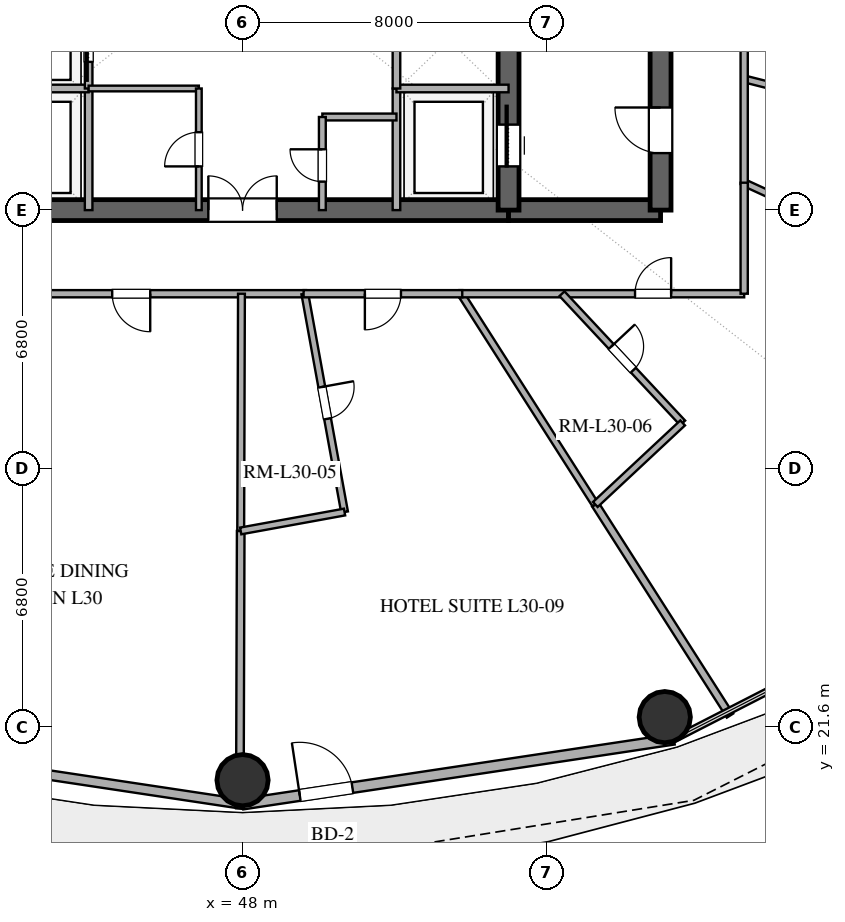
"""IFC4 building model, lengths in metres.
Left out: names, types, materials, properties, quantities, classifications, styles, units other than length and angle.
Written with IfcOpenShell. Run it as: python <this file> out.ifc"""

import sys

from ifc_helpers import new_model, si_unit, direction, frame, frame_2d, origin, origin_2d, place, context, subcontext, project, spatial, rectangle, hollow_circle, extrude, element, fill, save


model = new_model("IFC4")
c1 = context("Model", 3, precision=1e-05, world=origin(), true_north=direction((0.0, 1.0)))
c2 = subcontext(c1, "Body", "Model", "MODEL_VIEW")
j1 = project(units=[si_unit("LENGTHUNIT", "METRE"), si_unit("PLANEANGLEUNIT", "RADIAN")], contexts=[c1])
p1 = place(None, origin())
s1 = spatial("IfcSite", under=j1, at=p1, CompositionType="ELEMENT")
p2 = place(p1, origin())
s2 = spatial("IfcBuilding", under=s1, at=p2, CompositionType="ELEMENT")
p3 = place(p2, frame((0.0, 0.0, 120.0)))
s3 = spatial("IfcBuildingStorey", under=s2, at=p3, CompositionType="ELEMENT", Elevation=120.0)
p4 = place(p3, frame((41.0, 35.2, 0.0), z_axis=(0.0, 0.0, 1.0), x_axis=(1.0, 0.0, 0.0)))
e1 = element("IfcWall", 1, at=p4, inside=s3, PredefinedType="SHEAR", context=c2, shape_type="SweptSolid", body=[
    extrude(rectangle(XDim=14.0, YDim=0.55, at=frame_2d((7.0, 0.0))), origin(), (0.0, 0.0, 1.0), 3.38),
])
p5 = place(p4, frame((6.1, 0.0, 0.0)))
e2 = element("IfcOpeningElement", 2, at=p5, cuts=e1, PredefinedType="OPENING", context=c2, shape_type="SweptSolid", body=[
    extrude(rectangle(XDim=1.8, YDim=2.25, at=frame_2d((0.9, 1.125))), frame((0.0, 0.285, 0.0), z_axis=(0.0, -1.0, 0.0), x_axis=(1.0, 0.0, 0.0)), (0.0, 0.0, 1.0), 0.57),
])
p6 = place(p3, frame((55.0, 35.2, 0.0), z_axis=(0.0, 0.0, 1.0), x_axis=(1.0, 0.0, 0.0)))
e3 = element("IfcWall", 3, at=p6, inside=s3, PredefinedType="SHEAR", context=c2, shape_type="SweptSolid", body=[
    extrude(rectangle(XDim=4.0, YDim=0.55, at=frame_2d((2.0, 0.0))), origin(), (0.0, 0.0, 1.0), 3.38),
])
p7 = place(p3, frame((59.0, 35.2, 0.0), z_axis=(0.0, 0.0, 1.0), x_axis=(0.0, 1.0, 0.0)))
e4 = element("IfcWall", 4, at=p7, inside=s3, PredefinedType="SHEAR", context=c2, shape_type="SweptSolid", body=[
    extrude(rectangle(XDim=13.6, YDim=0.55, at=frame_2d((6.8, 0.0))), origin(), (0.0, 0.0, 1.0), 3.38),
])
p8 = place(p7, frame((1.5, 0.0, 0.0)))
e5 = element("IfcOpeningElement", 5, at=p8, cuts=e4, PredefinedType="OPENING", context=c2, shape_type="SweptSolid", body=[
    extrude(rectangle(XDim=1.2, YDim=2.15, at=frame_2d((0.6, 1.075))), frame((0.0, 0.285, 0.0), z_axis=(0.0, -1.0, 0.0), x_axis=(1.0, 0.0, 0.0)), (0.0, 0.0, 1.0), 0.57),
])
p9 = place(p3, frame((55.0, 35.2, 0.0), z_axis=(0.0, 0.0, 1.0), x_axis=(0.0, 1.0, 0.0)))
e6 = element("IfcWall", 6, at=p9, inside=s3, PredefinedType="SHEAR", context=c2, shape_type="SweptSolid", body=[
    extrude(rectangle(XDim=13.6, YDim=0.55, at=frame_2d((6.8, 0.0))), origin(), (0.0, 0.0, 1.0), 3.38),
])
p10 = place(p9, frame((1.15, 0.0, 0.0)))
e7 = element("IfcOpeningElement", 7, at=p10, cuts=e6, PredefinedType="OPENING", context=c2, shape_type="SweptSolid", body=[
    extrude(rectangle(XDim=1.1, YDim=2.2, at=frame_2d((0.55, 1.1))), frame((0.0, 0.285, 0.0), z_axis=(0.0, -1.0, 0.0), x_axis=(1.0, 0.0, 0.0)), (0.0, 0.0, 1.0), 0.57),
])
for number, where, z_axis, x_axis in (
    (8, (48.0, 20.2, 0.0), (0.0, 0.0, 1.0), (1.0, 0.0, 0.0)),
    (9, (59.11, 21.859, 0.0), (0.0, 0.0, 1.0), (1.0, 0.0, 0.0)),
):
    element("IfcColumn", number, at=place(p3, frame(where, z_axis=z_axis, x_axis=x_axis)), inside=s3, PredefinedType="COLUMN", context=c2, shape_type="SweptSolid", body=[
        extrude(hollow_circle(Radius=0.675, WallThickness=0.036, at=origin_2d()), origin(), (0.0, 0.0, 1.0), 3.38),
    ])
p11 = place(p3, frame((36.649, 21.277, 0.0), z_axis=(0.0, 0.0, 1.0), x_axis=(0.988877774656, -0.148730450117, 0.0)))
e10 = element("IfcWall", 10, at=p11, inside=s3, PredefinedType="SOLIDWALL", context=c2, shape_type="SweptSolid", body=[
    extrude(rectangle(XDim=11.479, YDim=0.25, at=frame_2d((5.74, 0.0))), origin(), (0.0, 0.0, 1.0), 3.38),
])
p12 = place(p11, frame((2.926, 0.0, 1.42)))
e11 = element("IfcOpeningElement", 11, at=p12, cuts=e10, PredefinedType="OPENING", context=c2, shape_type="SweptSolid", body=[
    extrude(rectangle(XDim=1.0, YDim=1.05, at=frame_2d((0.5, 0.525))), frame((0.0, 0.135, 0.0), z_axis=(0.0, -1.0, 0.0), x_axis=(1.0, 0.0, 0.0)), (0.0, 0.0, 1.0), 0.27),
])
p13 = place(p3, frame((48.0, 19.57, 0.0), z_axis=(0.0, 0.0, 1.0), x_axis=(0.988877774656, 0.148730450117, 0.0)))
e12 = element("IfcWall", 12, at=p13, inside=s3, PredefinedType="SOLIDWALL", context=c2, shape_type="SweptSolid", body=[
    extrude(rectangle(XDim=11.479, YDim=0.28, at=frame_2d((5.74, 0.0))), origin(), (0.0, 0.0, 1.0), 3.38),
])
p14 = place(p13, frame((1.524, 0.0, 0.0)))
e13 = element("IfcOpeningElement", 13, at=p14, cuts=e12, PredefinedType="OPENING", context=c2, shape_type="SweptSolid", body=[
    extrude(rectangle(XDim=1.4, YDim=2.2, at=frame_2d((0.7, 1.1))), frame((0.0, 0.15, 0.0), z_axis=(0.0, -1.0, 0.0), x_axis=(1.0, 0.0, 0.0)), (0.0, 0.0, 1.0), 0.3),
])
p15 = place(p3, frame((43.95, 35.2, 0.0), z_axis=(0.0, 0.0, 1.0), x_axis=(0.0, 1.0, 0.0)))
e14 = element("IfcWall", 14, at=p15, inside=s3, PredefinedType="SOLIDWALL", context=c2, shape_type="SweptSolid", body=[
    extrude(rectangle(XDim=3.2, YDim=0.2, at=frame_2d((1.6, 0.0))), origin(), (0.0, 0.0, 1.0), 2.74),
])
p16 = place(p3, frame((41.0, 38.4, 0.0), z_axis=(0.0, 0.0, 1.0), x_axis=(1.0, 0.0, 0.0)))
e15 = element("IfcWall", 15, at=p16, inside=s3, PredefinedType="SOLIDWALL", context=c2, shape_type="SweptSolid", body=[
    extrude(rectangle(XDim=2.95, YDim=0.2, at=frame_2d((1.475, 0.0))), origin(), (0.0, 0.0, 1.0), 2.74),
])
p17 = place(p3, frame((52.05, 35.2, 0.0), z_axis=(0.0, 0.0, 1.0), x_axis=(0.0, 1.0, 0.0)))
e16 = element("IfcWall", 16, at=p17, inside=s3, PredefinedType="SOLIDWALL", context=c2, shape_type="SweptSolid", body=[
    extrude(rectangle(XDim=3.2, YDim=0.2, at=frame_2d((1.6, 0.0))), origin(), (0.0, 0.0, 1.0), 2.74),
])
p18 = place(p3, frame((52.05, 38.4, 0.0), z_axis=(0.0, 0.0, 1.0), x_axis=(1.0, 0.0, 0.0)))
e17 = element("IfcWall", 17, at=p18, inside=s3, PredefinedType="SOLIDWALL", context=c2, shape_type="SweptSolid", body=[
    extrude(rectangle(XDim=2.95, YDim=0.2, at=frame_2d((1.475, 0.0))), origin(), (0.0, 0.0, 1.0), 2.74),
])
p19 = place(p3, frame((43.95, 38.4, 0.0), z_axis=(0.0, 0.0, 1.0), x_axis=(0.0, 1.0, 0.0)))
e18 = element("IfcWall", 18, at=p19, inside=s3, PredefinedType="SOLIDWALL", context=c2, shape_type="SweptSolid", body=[
    extrude(rectangle(XDim=7.8, YDim=0.2, at=frame_2d((3.9, 0.0))), origin(), (0.0, 0.0, 1.0), 2.74),
])
p20 = place(p19, frame((0.7, 0.0, 0.0)))
e19 = element("IfcOpeningElement", 19, at=p20, cuts=e18, PredefinedType="OPENING", context=c2, shape_type="SweptSolid", body=[
    extrude(rectangle(XDim=1.1, YDim=2.2, at=frame_2d((0.55, 1.1))), frame((0.0, 0.11, 0.0), z_axis=(0.0, -1.0, 0.0), x_axis=(1.0, 0.0, 0.0)), (0.0, 0.0, 1.0), 0.22),
])
p21 = place(p19, frame((3.3, 0.0, 0.0)))
e20 = element("IfcOpeningElement", 20, at=p21, cuts=e18, PredefinedType="OPENING", context=c2, shape_type="SweptSolid", body=[
    extrude(rectangle(XDim=1.1, YDim=2.2, at=frame_2d((0.55, 1.1))), frame((0.0, 0.11, 0.0), z_axis=(0.0, -1.0, 0.0), x_axis=(1.0, 0.0, 0.0)), (0.0, 0.0, 1.0), 0.22),
])
p22 = place(p3, frame((52.05, 38.4, 0.0), z_axis=(0.0, 0.0, 1.0), x_axis=(0.0, 1.0, 0.0)))
e21 = element("IfcWall", 21, at=p22, inside=s3, PredefinedType="SOLIDWALL", context=c2, shape_type="SweptSolid", body=[
    extrude(rectangle(XDim=10.4, YDim=0.2, at=frame_2d((5.2, 0.0))), origin(), (0.0, 0.0, 1.0), 2.74),
])
p23 = place(p22, frame((8.2, 0.0, 0.0)))
e22 = element("IfcOpeningElement", 22, at=p23, cuts=e21, PredefinedType="OPENING", context=c2, shape_type="SweptSolid", body=[
    extrude(rectangle(XDim=1.2, YDim=2.2, at=frame_2d((0.6, 1.1))), frame((0.0, 0.11, 0.0), z_axis=(0.0, -1.0, 0.0), x_axis=(1.0, 0.0, 0.0)), (0.0, 0.0, 1.0), 0.22),
])
p24 = place(p3, frame((43.95, 38.4, 0.0), z_axis=(0.0, 0.0, 1.0), x_axis=(1.0, 0.0, 0.0)))
e23 = element("IfcWall", 23, at=p24, inside=s3, PredefinedType="PARTITIONING", context=c2, shape_type="SweptSolid", body=[
    extrude(rectangle(XDim=2.9, YDim=0.15, at=frame_2d((1.45, 0.0))), origin(), (0.0, 0.0, 1.0), 2.74),
])
p25 = place(p3, frame((46.85, 35.2, 0.0), z_axis=(0.0, 0.0, 1.0), x_axis=(0.0, 1.0, 0.0)))
e24 = element("IfcWall", 24, at=p25, inside=s3, PredefinedType="PARTITIONING", context=c2, shape_type="SweptSolid", body=[
    extrude(rectangle(XDim=3.2, YDim=0.15, at=frame_2d((1.6, 0.0))), origin(), (0.0, 0.0, 1.0), 2.74),
])
p26 = place(p25, frame((1.15, 0.0, 0.0)))
e25 = element("IfcOpeningElement", 25, at=p26, cuts=e24, PredefinedType="OPENING", context=c2, shape_type="SweptSolid", body=[
    extrude(rectangle(XDim=0.9, YDim=2.15, at=frame_2d((0.45, 1.075))), frame((0.0, 0.085, 0.0), z_axis=(0.0, -1.0, 0.0), x_axis=(1.0, 0.0, 0.0)), (0.0, 0.0, 1.0), 0.17),
])
p27 = place(p3, frame((50.1, 37.65, 0.0), z_axis=(0.0, 0.0, 1.0), x_axis=(1.0, 0.0, 0.0)))
e26 = element("IfcWall", 26, at=p27, inside=s3, PredefinedType="PLUMBINGWALL", context=c2, shape_type="SweptSolid", body=[
    extrude(rectangle(XDim=1.95, YDim=0.18, at=frame_2d((0.975, 0.0))), origin(), (0.0, 0.0, 1.0), 2.74),
])
p28 = place(p3, frame((50.1, 35.2, 0.0), z_axis=(0.0, 0.0, 1.0), x_axis=(0.0, 1.0, 0.0)))
e27 = element("IfcWall", 27, at=p28, inside=s3, PredefinedType="PLUMBINGWALL", context=c2, shape_type="SweptSolid", body=[
    extrude(rectangle(XDim=2.45, YDim=0.18, at=frame_2d((1.225, 0.0))), origin(), (0.0, 0.0, 1.0), 2.74),
])
p29 = place(p28, frame((0.75, 0.0, 0.0)))
e28 = element("IfcOpeningElement", 28, at=p29, cuts=e27, PredefinedType="OPENING", context=c2, shape_type="SweptSolid", body=[
    extrude(rectangle(XDim=0.85, YDim=2.1, at=frame_2d((0.425, 1.05))), frame((0.0, 0.1, 0.0), z_axis=(0.0, -1.0, 0.0), x_axis=(1.0, 0.0, 0.0)), (0.0, 0.0, 1.0), 0.2),
])
p30 = place(p3, frame((47.928, 19.461, 0.0), z_axis=(0.0, 0.0, 1.0), x_axis=(0.003178198127, 0.999994949516, 0.0)))
e29 = element("IfcWall", 29, at=p30, inside=s3, PredefinedType="PARTITIONING", context=c2, shape_type="SweptSolid", body=[
    extrude(rectangle(XDim=7.298, YDim=0.2, at=frame_2d((3.649, 0.0))), origin(), (0.0, 0.0, 1.0), 2.74),
])
p31 = place(p3, frame((49.671, 33.0, 0.0), z_axis=(0.0, 0.0, 1.0), x_axis=(-1.0, 0.0, 0.0)))
e30 = element("IfcWall", 30, at=p31, inside=s3, PredefinedType="PARTITIONING", context=c2, shape_type="SweptSolid", body=[
    extrude(rectangle(XDim=14.871, YDim=0.19, at=frame_2d((7.436, 0.0))), origin(), (0.0, 0.0, 1.0), 2.74),
])
p32 = place(p31, frame((10.576, 0.0, 0.0)))
e31 = element("IfcOpeningElement", 31, at=p32, cuts=e30, PredefinedType="OPENING", context=c2, shape_type="SweptSolid", body=[
    extrude(rectangle(XDim=0.95, YDim=2.15, at=frame_2d((0.475, 1.075))), frame((0.0, 0.105, 0.0), z_axis=(0.0, -1.0, 0.0), x_axis=(1.0, 0.0, 0.0)), (0.0, 0.0, 1.0), 0.21),
])
p33 = place(p31, frame((4.101, 0.0, 0.0)))
e32 = element("IfcOpeningElement", 32, at=p33, cuts=e30, PredefinedType="OPENING", context=c2, shape_type="SweptSolid", body=[
    extrude(rectangle(XDim=1.0, YDim=2.2, at=frame_2d((0.5, 1.1))), frame((0.0, 0.105, 0.0), z_axis=(0.0, -1.0, 0.0), x_axis=(1.0, 0.0, 0.0)), (0.0, 0.0, 1.0), 0.21),
])
p34 = place(p3, frame((61.2, 38.653, 0.0), z_axis=(0.0, 0.0, 1.0), x_axis=(0.96932048276, -0.24580032893, 0.0)))
e33 = element("IfcWall", 33, at=p34, inside=s3, PredefinedType="PLUMBINGWALL", context=c2, shape_type="SweptSolid", body=[
    extrude(rectangle(XDim=6.684, YDim=0.18, at=frame_2d((3.342, 0.0))), origin(), (0.0, 0.0, 1.0), 2.74),
])
p35 = place(p34, frame((2.917, 0.0, 0.0)))
e34 = element("IfcOpeningElement", 34, at=p35, cuts=e33, PredefinedType="OPENING", context=c2, shape_type="SweptSolid", body=[
    extrude(rectangle(XDim=0.85, YDim=2.1, at=frame_2d((0.425, 1.05))), frame((0.0, 0.1, 0.0), z_axis=(0.0, -1.0, 0.0), x_axis=(1.0, 0.0, 0.0)), (0.0, 0.0, 1.0), 0.2),
])
p36 = place(p3, frame((60.828, 21.9, 0.0), z_axis=(0.0, 0.0, 1.0), x_axis=(-0.537968238966, 0.842965108331, 0.0)))
e35 = element("IfcWall", 35, at=p36, inside=s3, PredefinedType="PARTITIONING", context=c2, shape_type="SweptSolid", body=[
    extrude(rectangle(XDim=6.589, YDim=0.2, at=frame_2d((3.295, 0.0))), origin(), (0.0, 0.0, 1.0), 2.74),
])
p37 = place(p3, frame((57.283, 27.454, 0.0), z_axis=(0.0, 0.0, 1.0), x_axis=(-0.537984400251, 0.842954794213, 0.0)))
e36 = element("IfcWall", 36, at=p37, inside=s3, PredefinedType="PLUMBINGWALL", context=c2, shape_type="SweptSolid", body=[
    extrude(rectangle(XDim=6.579, YDim=0.18, at=frame_2d((3.29, 0.0))), origin(), (0.0, 0.0, 1.0), 2.74),
])
p38 = place(p3, frame((47.952, 26.758, 0.0), z_axis=(0.0, 0.0, 1.0), x_axis=(0.003168254458, 0.999994981069, 0.0)))
e37 = element("IfcWall", 37, at=p38, inside=s3, PredefinedType="PLUMBINGWALL", context=c2, shape_type="SweptSolid", body=[
    extrude(rectangle(XDim=6.242, YDim=0.18, at=frame_2d((3.121, 0.0))), origin(), (0.0, 0.0, 1.0), 2.74),
])
p39 = place(p3, frame((66.754, 33.363, 0.0), z_axis=(0.0, 0.0, 1.0), x_axis=(-0.908301480607, 0.418316172681, 0.0)))
e38 = element("IfcWall", 38, at=p39, inside=s3, PredefinedType="PLUMBINGWALL", context=c2, shape_type="SweptSolid", body=[
    extrude(rectangle(XDim=6.115, YDim=0.18, at=frame_2d((3.057, 0.0))), origin(), (0.0, 0.0, 1.0), 2.74),
])
p40 = place(p3, frame((49.638, 33.0, 0.0), z_axis=(0.0, 0.0, 1.0), x_axis=(0.179135653645, -0.983824383512, 0.0)))
e39 = element("IfcWall", 39, at=p40, inside=s3, PredefinedType="PLUMBINGWALL", context=c2, shape_type="SweptSolid", body=[
    extrude(rectangle(XDim=5.839, YDim=0.18, at=frame_2d((2.919, 0.0))), origin(), (0.0, 0.0, 1.0), 2.74),
])
p41 = place(p40, frame((2.494, 0.0, 0.0)))
e40 = element("IfcOpeningElement", 40, at=p41, cuts=e39, PredefinedType="OPENING", context=c2, shape_type="SweptSolid", body=[
    extrude(rectangle(XDim=0.85, YDim=2.1, at=frame_2d((0.425, 1.05))), frame((0.0, 0.1, 0.0), z_axis=(0.0, -1.0, 0.0), x_axis=(1.0, 0.0, 0.0)), (0.0, 0.0, 1.0), 0.2),
])
p42 = place(p3, frame((61.2, 46.45, 0.0), z_axis=(0.0, 0.0, 1.0), x_axis=(0.0, -1.0, 0.0)))
e41 = element("IfcWall", 41, at=p42, inside=s3, PredefinedType="PARTITIONING", context=c2, shape_type="SweptSolid", body=[
    extrude(rectangle(XDim=10.564, YDim=0.19, at=frame_2d((5.282, 0.0))), origin(), (0.0, 0.0, 1.0), 2.74),
])
p43 = place(p42, frame((4.722, 0.0, 0.0)))
e42 = element("IfcOpeningElement", 42, at=p43, cuts=e41, PredefinedType="OPENING", context=c2, shape_type="SweptSolid", body=[
    extrude(rectangle(XDim=0.95, YDim=2.15, at=frame_2d((0.475, 1.075))), frame((0.0, 0.105, 0.0), z_axis=(0.0, -1.0, 0.0), x_axis=(1.0, 0.0, 0.0)), (0.0, 0.0, 1.0), 0.21),
])
p44 = place(p3, frame((53.706, 33.0, 0.0), z_axis=(0.0, 0.0, 1.0), x_axis=(1.0, 0.0, 0.0)))
e43 = element("IfcWall", 43, at=p44, inside=s3, PredefinedType="PARTITIONING", context=c2, shape_type="SweptSolid", body=[
    extrude(rectangle(XDim=7.494, YDim=0.19, at=frame_2d((3.747, 0.0))), origin(), (0.0, 0.0, 1.0), 2.74),
])
p45 = place(p44, frame((4.622, 0.0, 0.0)))
e44 = element("IfcOpeningElement", 44, at=p45, cuts=e43, PredefinedType="OPENING", context=c2, shape_type="SweptSolid", body=[
    extrude(rectangle(XDim=0.95, YDim=2.15, at=frame_2d((0.475, 1.075))), frame((0.0, 0.105, 0.0), z_axis=(0.0, -1.0, 0.0), x_axis=(1.0, 0.0, 0.0)), (0.0, 0.0, 1.0), 0.21),
])
p46 = place(p3, frame((56.406, 33.0, 0.0), z_axis=(0.0, 0.0, 1.0), x_axis=(0.682578142961, -0.730812615348, 0.0)))
e45 = element("IfcWall", 45, at=p46, inside=s3, PredefinedType="PLUMBINGWALL", context=c2, shape_type="SweptSolid", body=[
    extrude(rectangle(XDim=4.652, YDim=0.18, at=frame_2d((2.326, 0.0))), origin(), (0.0, 0.0, 1.0), 2.74),
])
p47 = place(p46, frame((1.901, 0.0, 0.0)))
e46 = element("IfcOpeningElement", 46, at=p47, cuts=e45, PredefinedType="OPENING", context=c2, shape_type="SweptSolid", body=[
    extrude(rectangle(XDim=0.85, YDim=2.1, at=frame_2d((0.425, 1.05))), frame((0.0, 0.1, 0.0), z_axis=(0.0, -1.0, 0.0), x_axis=(1.0, 0.0, 0.0)), (0.0, 0.0, 1.0), 0.2),
])
p48 = place(p3, frame((53.782, 33.0, 0.0), z_axis=(0.0, 0.0, 1.0), x_axis=(-1.0, 0.0, 0.0)))
e47 = element("IfcWall", 47, at=p48, inside=s3, PredefinedType="PARTITIONING", context=c2, shape_type="SweptSolid", body=[
    extrude(rectangle(XDim=4.176, YDim=0.19, at=frame_2d((2.088, 0.0))), origin(), (0.0, 0.0, 1.0), 2.74),
])
p49 = place(p48, frame((1.613, 0.0, 0.0)))
e48 = element("IfcOpeningElement", 48, at=p49, cuts=e47, PredefinedType="OPENING", context=c2, shape_type="SweptSolid", body=[
    extrude(rectangle(XDim=0.95, YDim=2.15, at=frame_2d((0.475, 1.075))), frame((0.0, 0.105, 0.0), z_axis=(0.0, -1.0, 0.0), x_axis=(1.0, 0.0, 0.0)), (0.0, 0.0, 1.0), 0.21),
])
p50 = place(p3, frame((59.581, 29.601, 0.0), z_axis=(0.0, 0.0, 1.0), x_axis=(-0.730840933831, -0.682547822088, 0.0)))
e49 = element("IfcWall", 49, at=p50, inside=s3, PredefinedType="PLUMBINGWALL", context=c2, shape_type="SweptSolid", body=[
    extrude(rectangle(XDim=3.145, YDim=0.18, at=frame_2d((1.572, 0.0))), origin(), (0.0, 0.0, 1.0), 2.74),
])
p51 = place(p3, frame((61.2, 33.0, 0.0), z_axis=(0.0, 0.0, 1.0), x_axis=(0.0, 1.0, 0.0)))
e50 = element("IfcWall", 50, at=p51, inside=s3, PredefinedType="PARTITIONING", context=c2, shape_type="SweptSolid", body=[
    extrude(rectangle(XDim=2.921, YDim=0.19, at=frame_2d((1.46, 0.0))), origin(), (0.0, 0.0, 1.0), 2.74),
])
p52 = place(p3, frame((50.684, 27.256, 0.0), z_axis=(0.0, 0.0, 1.0), x_axis=(-0.983824875987, -0.17913294892, 0.0)))
e51 = element("IfcWall", 51, at=p52, inside=s3, PredefinedType="PLUMBINGWALL", context=c2, shape_type="SweptSolid", body=[
    extrude(rectangle(XDim=2.778, YDim=0.18, at=frame_2d((1.389, 0.0))), origin(), (0.0, 0.0, 1.0), 2.74),
])
p53 = place(p14, origin())
e52 = element("IfcDoor", 52, at=p53, inside=s3, OperationType="SINGLE_SWING_LEFT", PredefinedType="DOOR", context=c2, shape_type="SweptSolid", body=[
    extrude(rectangle(XDim=1.4, YDim=2.2, at=frame_2d((0.7, 1.1))), frame((0.0, 0.025, 0.0), z_axis=(0.0, -1.0, 0.0), x_axis=(1.0, 0.0, 0.0)), (0.0, 0.0, 1.0), 0.05),
])
fill(e13, e52)
p54 = place(p10, origin())
e53 = element("IfcDoor", 53, at=p54, inside=s3, OperationType="SLIDING_TO_RIGHT", PredefinedType="DOOR", context=c2, shape_type="SweptSolid", body=[
    extrude(rectangle(XDim=1.1, YDim=2.2, at=frame_2d((0.55, 1.1))), frame((0.0, 0.025, 0.0), z_axis=(0.0, -1.0, 0.0), x_axis=(1.0, 0.0, 0.0)), (0.0, 0.0, 1.0), 0.05),
])
fill(e7, e53)
p55 = place(p8, origin())
e54 = element("IfcDoor", 54, at=p55, inside=s3, OperationType="SINGLE_SWING_RIGHT", PredefinedType="DOOR", context=c2, shape_type="SweptSolid", body=[
    extrude(rectangle(XDim=1.2, YDim=2.15, at=frame_2d((0.6, 1.075))), frame((0.0, 0.025, 0.0), z_axis=(0.0, -1.0, 0.0), x_axis=(1.0, 0.0, 0.0)), (0.0, 0.0, 1.0), 0.05),
])
fill(e5, e54)
p56 = place(p5, origin())
e55 = element("IfcDoor", 55, at=p56, inside=s3, OperationType="DOUBLE_DOOR_SINGLE_SWING", PredefinedType="DOOR", context=c2, shape_type="SweptSolid", body=[
    extrude(rectangle(XDim=1.8, YDim=2.25, at=frame_2d((0.9, 1.125))), frame((0.0, 0.025, 0.0), z_axis=(0.0, -1.0, 0.0), x_axis=(1.0, 0.0, 0.0)), (0.0, 0.0, 1.0), 0.05),
])
fill(e2, e55)
p57 = place(p20, origin())
e56 = element("IfcDoor", 56, at=p57, inside=s3, OperationType="SLIDING_TO_LEFT", PredefinedType="DOOR", context=c2, shape_type="SweptSolid", body=[
    extrude(rectangle(XDim=1.1, YDim=2.2, at=frame_2d((0.55, 1.1))), frame((0.0, 0.025, 0.0), z_axis=(0.0, -1.0, 0.0), x_axis=(1.0, 0.0, 0.0)), (0.0, 0.0, 1.0), 0.05),
])
fill(e19, e56)
p58 = place(p26, origin())
e57 = element("IfcDoor", 57, at=p58, inside=s3, OperationType="SINGLE_SWING_LEFT", PredefinedType="DOOR", context=c2, shape_type="SweptSolid", body=[
    extrude(rectangle(XDim=0.9, YDim=2.15, at=frame_2d((0.45, 1.075))), frame((0.0, 0.025, 0.0), z_axis=(0.0, -1.0, 0.0), x_axis=(1.0, 0.0, 0.0)), (0.0, 0.0, 1.0), 0.05),
])
fill(e25, e57)
p59 = place(p29, origin())
e58 = element("IfcDoor", 58, at=p59, inside=s3, OperationType="SINGLE_SWING_RIGHT", PredefinedType="DOOR", context=c2, shape_type="SweptSolid", body=[
    extrude(rectangle(XDim=0.85, YDim=2.1, at=frame_2d((0.425, 1.05))), frame((0.0, 0.025, 0.0), z_axis=(0.0, -1.0, 0.0), x_axis=(1.0, 0.0, 0.0)), (0.0, 0.0, 1.0), 0.05),
])
fill(e28, e58)
p60 = place(p33, origin())
e59 = element("IfcDoor", 59, at=p60, inside=s3, OperationType="SINGLE_SWING_LEFT", PredefinedType="DOOR", context=c2, shape_type="SweptSolid", body=[
    extrude(rectangle(XDim=1.0, YDim=2.2, at=frame_2d((0.5, 1.1))), frame((0.0, 0.025, 0.0), z_axis=(0.0, -1.0, 0.0), x_axis=(1.0, 0.0, 0.0)), (0.0, 0.0, 1.0), 0.05),
])
fill(e32, e59)
p61 = place(p41, origin())
e60 = element("IfcDoor", 60, at=p61, inside=s3, OperationType="SINGLE_SWING_LEFT", PredefinedType="DOOR", context=c2, shape_type="SweptSolid", body=[
    extrude(rectangle(XDim=0.85, YDim=2.1, at=frame_2d((0.425, 1.05))), frame((0.0, 0.025, 0.0), z_axis=(0.0, -1.0, 0.0), x_axis=(1.0, 0.0, 0.0)), (0.0, 0.0, 1.0), 0.05),
])
fill(e40, e60)
p62 = place(p45, origin())
e61 = element("IfcDoor", 61, at=p62, inside=s3, OperationType="SINGLE_SWING_RIGHT", PredefinedType="DOOR", context=c2, shape_type="SweptSolid", body=[
    extrude(rectangle(XDim=0.95, YDim=2.15, at=frame_2d((0.475, 1.075))), frame((0.0, 0.025, 0.0), z_axis=(0.0, -1.0, 0.0), x_axis=(1.0, 0.0, 0.0)), (0.0, 0.0, 1.0), 0.05),
])
fill(e44, e61)
p63 = place(p47, origin())
e62 = element("IfcDoor", 62, at=p63, inside=s3, OperationType="SINGLE_SWING_LEFT", PredefinedType="DOOR", context=c2, shape_type="SweptSolid", body=[
    extrude(rectangle(XDim=0.85, YDim=2.1, at=frame_2d((0.425, 1.05))), frame((0.0, 0.025, 0.0), z_axis=(0.0, -1.0, 0.0), x_axis=(1.0, 0.0, 0.0)), (0.0, 0.0, 1.0), 0.05),
])
fill(e46, e62)
p64 = place(p49, origin())
e63 = element("IfcDoor", 63, at=p64, inside=s3, OperationType="SINGLE_SWING_RIGHT", PredefinedType="DOOR", context=c2, shape_type="SweptSolid", body=[
    extrude(rectangle(XDim=0.95, YDim=2.15, at=frame_2d((0.475, 1.075))), frame((0.0, 0.025, 0.0), z_axis=(0.0, -1.0, 0.0), x_axis=(1.0, 0.0, 0.0)), (0.0, 0.0, 1.0), 0.05),
])
fill(e48, e63)
save(model, sys.argv[1])
